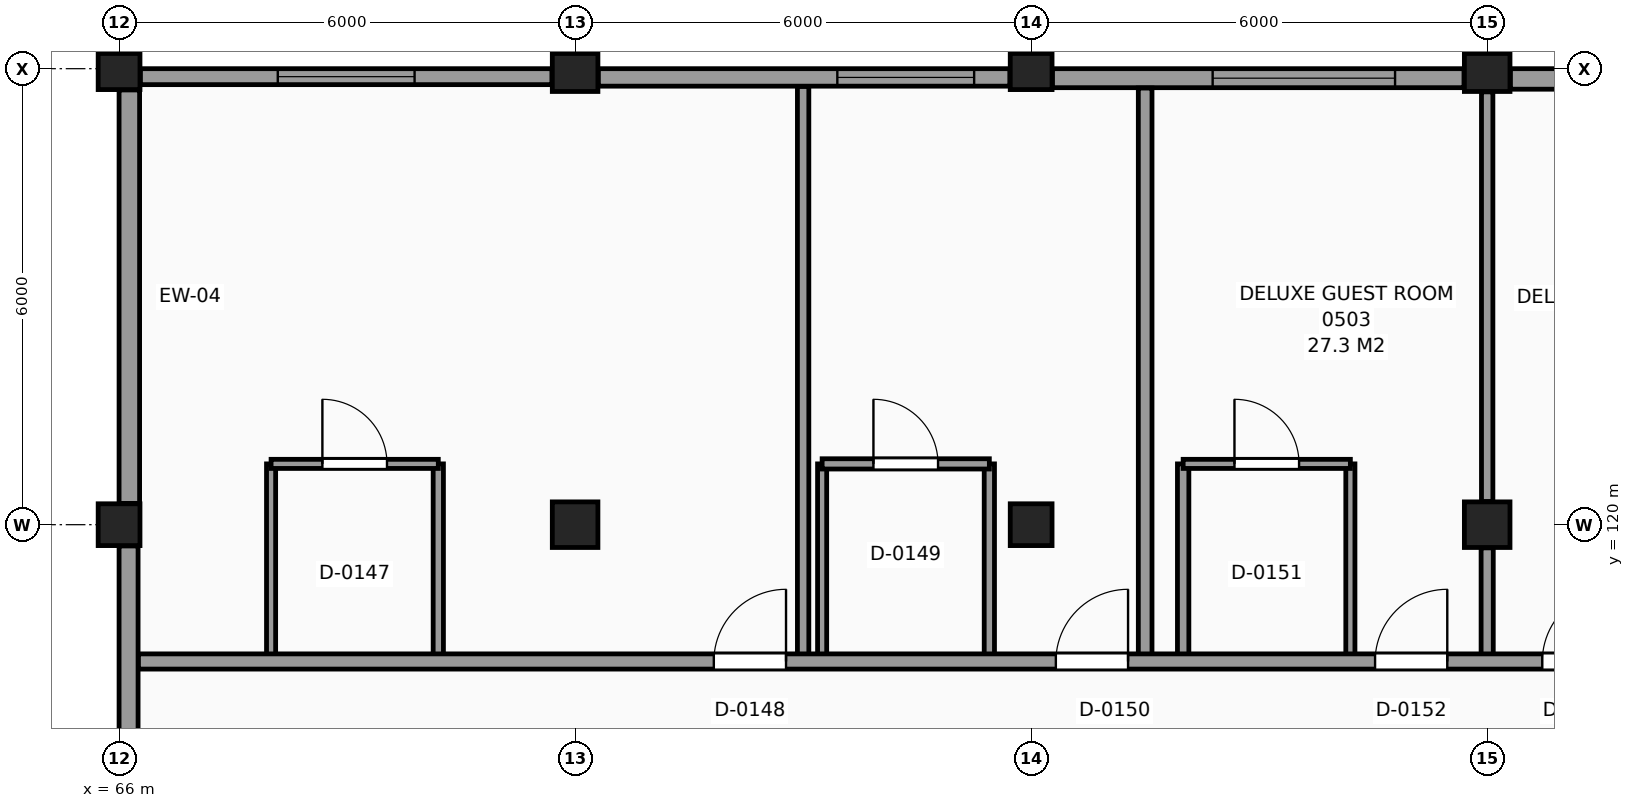
"""IFC4 building model, lengths in metres.
Left out: names, types, materials, properties, quantities, classifications, styles, units other than length and angle.
Written with IfcOpenShell. Run it as: python <this file> out.ifc"""

import sys

from ifc_helpers import new_model, si_unit, direction, frame, frame_2d, origin, origin_2d, place, context, subcontext, project, spatial, rectangle, extrude, element, fill, save


model = new_model("IFC4")
c1 = context("Model", 3, precision=1e-05, world=origin(), true_north=direction((0.0, 1.0)))
c2 = subcontext(c1, "Body", "Model", "MODEL_VIEW")
j1 = project(units=[si_unit("LENGTHUNIT", "METRE"), si_unit("PLANEANGLEUNIT", "RADIAN")], contexts=[c1])
p1 = place(None, origin())
s1 = spatial("IfcSite", under=j1, at=p1, CompositionType="ELEMENT")
p2 = place(p1, origin())
s2 = spatial("IfcBuilding", under=s1, at=p2, CompositionType="ELEMENT")
p3 = place(p2, frame((0.0, 0.0, 24.6)))
s3 = spatial("IfcBuildingStorey", under=s2, at=p3, CompositionType="ELEMENT", Elevation=24.6)
for number, where, z_axis, x_axis in (
    (1, (66.0, 120.0, 0.0), (0.0, 0.0, 1.0), (1.0, 0.0, 0.0)),
    (2, (66.0, 126.0, 0.0), (0.0, 0.0, 1.0), (1.0, 0.0, 0.0)),
):
    element("IfcColumn", number, at=place(p3, frame(where, z_axis=z_axis, x_axis=x_axis)), inside=s3, PredefinedType="COLUMN", context=c2, shape_type="SweptSolid", body=[
        extrude(rectangle(XDim=0.55, YDim=0.55, at=origin_2d()), origin(), (0.0, 0.0, 1.0), 3.6),
    ])
for number, where, z_axis, x_axis in (
    (3, (72.0, 120.0, 0.0), (0.0, 0.0, 1.0), (1.0, 0.0, 0.0)),
    (4, (72.0, 126.0, 0.0), (0.0, 0.0, 1.0), (1.0, 0.0, 0.0)),
):
    element("IfcColumn", number, at=place(p3, frame(where, z_axis=z_axis, x_axis=x_axis)), inside=s3, PredefinedType="COLUMN", context=c2, shape_type="SweptSolid", body=[
        extrude(rectangle(XDim=0.6, YDim=0.6, at=origin_2d()), origin(), (0.0, 0.0, 1.0), 3.6),
    ])
for number, where, z_axis, x_axis in (
    (5, (78.0, 120.0, 0.0), (0.0, 0.0, 1.0), (1.0, 0.0, 0.0)),
    (6, (78.0, 126.0, 0.0), (0.0, 0.0, 1.0), (1.0, 0.0, 0.0)),
):
    element("IfcColumn", number, at=place(p3, frame(where, z_axis=z_axis, x_axis=x_axis)), inside=s3, PredefinedType="COLUMN", context=c2, shape_type="SweptSolid", body=[
        extrude(rectangle(XDim=0.55, YDim=0.55, at=origin_2d()), origin(), (0.0, 0.0, 1.0), 3.6),
    ])
for number, where, z_axis, x_axis in (
    (7, (84.0, 120.0, 0.0), (0.0, 0.0, 1.0), (1.0, 0.0, 0.0)),
    (8, (84.0, 126.0, 0.0), (0.0, 0.0, 1.0), (1.0, 0.0, 0.0)),
):
    element("IfcColumn", number, at=place(p3, frame(where, z_axis=z_axis, x_axis=x_axis)), inside=s3, PredefinedType="COLUMN", context=c2, shape_type="SweptSolid", body=[
        extrude(rectangle(XDim=0.6, YDim=0.6, at=origin_2d()), origin(), (0.0, 0.0, 1.0), 3.6),
    ])
p4 = place(p3, frame((89.72, 125.865, 0.0), z_axis=(0.0, 0.0, 1.0), x_axis=(-1.0, 0.0, 0.0)))
e9 = element("IfcWall", 9, at=p4, inside=s3, PredefinedType="SOLIDWALL", context=c2, shape_type="SweptSolid", body=[
    extrude(rectangle(XDim=5.415, YDim=0.27, at=frame_2d((2.708, 0.0))), origin(), (0.0, 0.0, 1.0), 2.73),
])
p5 = place(p4, frame((2.108, 0.0, 0.8)))
e10 = element("IfcOpeningElement", 10, at=p5, cuts=e9, PredefinedType="OPENING", context=c2, shape_type="SweptSolid", body=[
    extrude(rectangle(XDim=2.4, YDim=1.75, at=frame_2d((1.2, 0.875))), frame((0.0, 0.145, 0.0), z_axis=(0.0, -1.0, 0.0), x_axis=(1.0, 0.0, 0.0)), (0.0, 0.0, 1.0), 0.29),
])
p6 = place(p3, frame((83.695, 125.875, 0.0), z_axis=(0.0, 0.0, 1.0), x_axis=(-1.0, 0.0, 0.0)))
e11 = element("IfcWall", 11, at=p6, inside=s3, PredefinedType="SOLIDWALL", context=c2, shape_type="SweptSolid", body=[
    extrude(rectangle(XDim=5.415, YDim=0.25, at=frame_2d((2.708, 0.0))), origin(), (0.0, 0.0, 1.0), 2.73),
])
p7 = place(p6, frame((0.907, 0.0, 0.8)))
e12 = element("IfcOpeningElement", 12, at=p7, cuts=e11, PredefinedType="OPENING", context=c2, shape_type="SweptSolid", body=[
    extrude(rectangle(XDim=2.4, YDim=1.75, at=frame_2d((1.2, 0.875))), frame((0.0, 0.135, 0.0), z_axis=(0.0, -1.0, 0.0), x_axis=(1.0, 0.0, 0.0)), (0.0, 0.0, 1.0), 0.27),
])
p8 = place(p3, frame((77.72, 125.885, 0.0), z_axis=(0.0, 0.0, 1.0), x_axis=(-1.0, 0.0, 0.0)))
e13 = element("IfcWall", 13, at=p8, inside=s3, PredefinedType="SOLIDWALL", context=c2, shape_type="SweptSolid", body=[
    extrude(rectangle(XDim=5.415, YDim=0.23, at=frame_2d((2.708, 0.0))), origin(), (0.0, 0.0, 1.0), 2.73),
])
p9 = place(p8, frame((0.47, 0.0, 0.8)))
e14 = element("IfcOpeningElement", 14, at=p9, cuts=e13, PredefinedType="OPENING", context=c2, shape_type="SweptSolid", body=[
    extrude(rectangle(XDim=1.8, YDim=1.7, at=frame_2d((0.9, 0.85))), frame((0.0, 0.125, 0.0), z_axis=(0.0, -1.0, 0.0), x_axis=(1.0, 0.0, 0.0)), (0.0, 0.0, 1.0), 0.25),
])
p10 = place(p3, frame((71.695, 125.895, 0.0), z_axis=(0.0, 0.0, 1.0), x_axis=(-1.0, 0.0, 0.0)))
e15 = element("IfcWall", 15, at=p10, inside=s3, PredefinedType="SOLIDWALL", context=c2, shape_type="SweptSolid", body=[
    extrude(rectangle(XDim=5.415, YDim=0.21, at=frame_2d((2.708, 0.0))), origin(), (0.0, 0.0, 1.0), 2.73),
])
p11 = place(p10, frame((1.807, 0.0, 0.8)))
e16 = element("IfcOpeningElement", 16, at=p11, cuts=e15, PredefinedType="OPENING", context=c2, shape_type="SweptSolid", body=[
    extrude(rectangle(XDim=1.8, YDim=1.7, at=frame_2d((0.9, 0.85))), frame((0.0, 0.115, 0.0), z_axis=(0.0, -1.0, 0.0), x_axis=(1.0, 0.0, 0.0)), (0.0, 0.0, 1.0), 0.23),
])
p12 = place(p3, frame((66.135, 125.72, 0.0), z_axis=(0.0, 0.0, 1.0), x_axis=(0.0, -1.0, 0.0)))
e17 = element("IfcWall", 17, at=p12, inside=s3, PredefinedType="SOLIDWALL", context=c2, shape_type="SweptSolid", body=[
    extrude(rectangle(XDim=5.44, YDim=0.27, at=frame_2d((2.72, 0.0))), origin(), (0.0, 0.0, 1.0), 2.58),
])
p13 = place(p3, frame((66.125, 119.72, 0.0), z_axis=(0.0, 0.0, 1.0), x_axis=(0.0, -1.0, 0.0)))
e18 = element("IfcWall", 18, at=p13, inside=s3, PredefinedType="SOLIDWALL", context=c2, shape_type="SweptSolid", body=[
    extrude(rectangle(XDim=5.44, YDim=0.25, at=frame_2d((2.72, 0.0))), origin(), (0.0, 0.0, 1.0), 2.58),
])
p14 = place(p3, frame((68.0, 118.2, 0.0), z_axis=(0.0, 0.0, 1.0), x_axis=(0.0, 1.0, 0.0)))
e19 = element("IfcWall", 19, at=p14, inside=s3, PredefinedType="PARTITIONING", context=c2, shape_type="SweptSolid", body=[
    extrude(rectangle(XDim=2.6, YDim=0.12, at=frame_2d((1.3, 0.0))), origin(), (0.0, 0.0, 1.0), 3.38),
])
p15 = place(p3, frame((70.2, 118.2, 0.0), z_axis=(0.0, 0.0, 1.0), x_axis=(0.0, 1.0, 0.0)))
e20 = element("IfcWall", 20, at=p15, inside=s3, PredefinedType="PARTITIONING", context=c2, shape_type="SweptSolid", body=[
    extrude(rectangle(XDim=2.6, YDim=0.135, at=frame_2d((1.3, 0.0))), origin(), (0.0, 0.0, 1.0), 3.38),
])
p16 = place(p3, frame((75.0, 118.2, 0.0), z_axis=(0.0, 0.0, 1.0), x_axis=(0.0, 1.0, 0.0)))
e21 = element("IfcWall", 21, at=p16, inside=s3, PredefinedType="PARTITIONING", context=c2, shape_type="SweptSolid", body=[
    extrude(rectangle(XDim=7.565, YDim=0.15, at=frame_2d((3.782, 0.0))), origin(), (0.0, 0.0, 1.0), 3.38),
])
p17 = place(p3, frame((75.25, 118.2, 0.0), z_axis=(0.0, 0.0, 1.0), x_axis=(0.0, 1.0, 0.0)))
e22 = element("IfcWall", 22, at=p17, inside=s3, PredefinedType="PARTITIONING", context=c2, shape_type="SweptSolid", body=[
    extrude(rectangle(XDim=2.6, YDim=0.12, at=frame_2d((1.3, 0.0))), origin(), (0.0, 0.0, 1.0), 3.38),
])
p18 = place(p3, frame((77.45, 118.2, 0.0), z_axis=(0.0, 0.0, 1.0), x_axis=(0.0, 1.0, 0.0)))
e23 = element("IfcWall", 23, at=p18, inside=s3, PredefinedType="PARTITIONING", context=c2, shape_type="SweptSolid", body=[
    extrude(rectangle(XDim=2.6, YDim=0.135, at=frame_2d((1.3, 0.0))), origin(), (0.0, 0.0, 1.0), 3.38),
])
p19 = place(p3, frame((79.5, 118.2, 0.0), z_axis=(0.0, 0.0, 1.0), x_axis=(0.0, 1.0, 0.0)))
e24 = element("IfcWall", 24, at=p19, inside=s3, PredefinedType="PARTITIONING", context=c2, shape_type="SweptSolid", body=[
    extrude(rectangle(XDim=7.545, YDim=0.18, at=frame_2d((3.772, 0.0))), origin(), (0.0, 0.0, 1.0), 3.38),
])
p20 = place(p3, frame((80.0, 118.2, 0.0), z_axis=(0.0, 0.0, 1.0), x_axis=(0.0, 1.0, 0.0)))
e25 = element("IfcWall", 25, at=p20, inside=s3, PredefinedType="PARTITIONING", context=c2, shape_type="SweptSolid", body=[
    extrude(rectangle(XDim=2.6, YDim=0.15, at=frame_2d((1.3, 0.0))), origin(), (0.0, 0.0, 1.0), 3.38),
])
p21 = place(p3, frame((82.2, 118.2, 0.0), z_axis=(0.0, 0.0, 1.0), x_axis=(0.0, 1.0, 0.0)))
e26 = element("IfcWall", 26, at=p21, inside=s3, PredefinedType="PARTITIONING", context=c2, shape_type="SweptSolid", body=[
    extrude(rectangle(XDim=2.6, YDim=0.12, at=frame_2d((1.3, 0.0))), origin(), (0.0, 0.0, 1.0), 3.38),
])
p22 = place(p3, frame((84.0, 118.2, 0.0), z_axis=(0.0, 0.0, 1.0), x_axis=(0.0, 1.0, 0.0)))
e27 = element("IfcWall", 27, at=p22, inside=s3, PredefinedType="PARTITIONING", context=c2, shape_type="SweptSolid", body=[
    extrude(rectangle(XDim=1.495, YDim=0.16, at=frame_2d((0.748, 0.0))), origin(), (0.0, 0.0, 1.0), 2.58),
])
p23 = place(p3, frame((84.0, 120.305, 0.0), z_axis=(0.0, 0.0, 1.0), x_axis=(0.0, 1.0, 0.0)))
e28 = element("IfcWall", 28, at=p23, inside=s3, PredefinedType="PARTITIONING", context=c2, shape_type="SweptSolid", body=[
    extrude(rectangle(XDim=5.39, YDim=0.15, at=frame_2d((2.695, 0.0))), origin(), (0.0, 0.0, 1.0), 2.58),
])
p24 = place(p3, frame((66.255, 118.2, 0.0), z_axis=(0.0, 0.0, 1.0), x_axis=(1.0, 0.0, 0.0)))
e29 = element("IfcWall", 29, at=p24, inside=s3, PredefinedType="PARTITIONING", context=c2, shape_type="SweptSolid", body=[
    extrude(rectangle(XDim=110.245, YDim=0.2, at=frame_2d((55.123, 0.0))), origin(), (0.0, 0.0, 1.0), 3.38),
])
p25 = place(p24, frame((7.57, 0.0, 0.0)))
e30 = element("IfcOpeningElement", 30, at=p25, cuts=e29, PredefinedType="OPENING", context=c2, shape_type="SweptSolid", body=[
    extrude(rectangle(XDim=0.95, YDim=2.1, at=frame_2d((0.475, 1.05))), frame((0.0, 0.11, 0.0), z_axis=(0.0, -1.0, 0.0), x_axis=(1.0, 0.0, 0.0)), (0.0, 0.0, 1.0), 0.22),
])
p26 = place(p24, frame((12.07, 0.0, 0.0)))
e31 = element("IfcOpeningElement", 31, at=p26, cuts=e29, PredefinedType="OPENING", context=c2, shape_type="SweptSolid", body=[
    extrude(rectangle(XDim=0.95, YDim=2.1, at=frame_2d((0.475, 1.05))), frame((0.0, 0.11, 0.0), z_axis=(0.0, -1.0, 0.0), x_axis=(1.0, 0.0, 0.0)), (0.0, 0.0, 1.0), 0.22),
])
p27 = place(p24, frame((16.27, 0.0, 0.0)))
e32 = element("IfcOpeningElement", 32, at=p27, cuts=e29, PredefinedType="OPENING", context=c2, shape_type="SweptSolid", body=[
    extrude(rectangle(XDim=0.95, YDim=2.1, at=frame_2d((0.475, 1.05))), frame((0.0, 0.11, 0.0), z_axis=(0.0, -1.0, 0.0), x_axis=(1.0, 0.0, 0.0)), (0.0, 0.0, 1.0), 0.22),
])
p28 = place(p24, frame((18.47, 0.0, 0.0)))
e33 = element("IfcOpeningElement", 33, at=p28, cuts=e29, PredefinedType="OPENING", context=c2, shape_type="SweptSolid", body=[
    extrude(rectangle(XDim=0.95, YDim=2.1, at=frame_2d((0.475, 1.05))), frame((0.0, 0.11, 0.0), z_axis=(0.0, -1.0, 0.0), x_axis=(1.0, 0.0, 0.0)), (0.0, 0.0, 1.0), 0.22),
])
p29 = place(p24, frame((32.32, 0.0, 0.0)))
e34 = element("IfcOpeningElement", 34, at=p29, cuts=e29, PredefinedType="OPENING", context=c2, shape_type="SweptSolid", body=[
    extrude(rectangle(XDim=0.95, YDim=2.1, at=frame_2d((0.475, 1.05))), frame((0.0, 0.11, 0.0), z_axis=(0.0, -1.0, 0.0), x_axis=(1.0, 0.0, 0.0)), (0.0, 0.0, 1.0), 0.22),
])
p30 = place(p24, frame((36.47, 0.0, 0.0)))
e35 = element("IfcOpeningElement", 35, at=p30, cuts=e29, PredefinedType="OPENING", context=c2, shape_type="SweptSolid", body=[
    extrude(rectangle(XDim=0.95, YDim=2.1, at=frame_2d((0.475, 1.05))), frame((0.0, 0.11, 0.0), z_axis=(0.0, -1.0, 0.0), x_axis=(1.0, 0.0, 0.0)), (0.0, 0.0, 1.0), 0.22),
])
p31 = place(p24, frame((46.27, 0.0, 0.0)))
e36 = element("IfcOpeningElement", 36, at=p31, cuts=e29, PredefinedType="OPENING", context=c2, shape_type="SweptSolid", body=[
    extrude(rectangle(XDim=0.95, YDim=2.1, at=frame_2d((0.475, 1.05))), frame((0.0, 0.11, 0.0), z_axis=(0.0, -1.0, 0.0), x_axis=(1.0, 0.0, 0.0)), (0.0, 0.0, 1.0), 0.22),
])
p32 = place(p24, frame((48.47, 0.0, 0.0)))
e37 = element("IfcOpeningElement", 37, at=p32, cuts=e29, PredefinedType="OPENING", context=c2, shape_type="SweptSolid", body=[
    extrude(rectangle(XDim=0.95, YDim=2.1, at=frame_2d((0.475, 1.05))), frame((0.0, 0.11, 0.0), z_axis=(0.0, -1.0, 0.0), x_axis=(1.0, 0.0, 0.0)), (0.0, 0.0, 1.0), 0.22),
])
p33 = place(p24, frame((52.87, 0.0, 0.0)))
e38 = element("IfcOpeningElement", 38, at=p33, cuts=e29, PredefinedType="OPENING", context=c2, shape_type="SweptSolid", body=[
    extrude(rectangle(XDim=0.95, YDim=2.1, at=frame_2d((0.475, 1.05))), frame((0.0, 0.11, 0.0), z_axis=(0.0, -1.0, 0.0), x_axis=(1.0, 0.0, 0.0)), (0.0, 0.0, 1.0), 0.22),
])
p34 = place(p24, frame((60.07, 0.0, 0.0)))
e39 = element("IfcOpeningElement", 39, at=p34, cuts=e29, PredefinedType="OPENING", context=c2, shape_type="SweptSolid", body=[
    extrude(rectangle(XDim=0.95, YDim=2.1, at=frame_2d((0.475, 1.05))), frame((0.0, 0.11, 0.0), z_axis=(0.0, -1.0, 0.0), x_axis=(1.0, 0.0, 0.0)), (0.0, 0.0, 1.0), 0.22),
])
p35 = place(p24, frame((68.32, 0.0, 0.0)))
e40 = element("IfcOpeningElement", 40, at=p35, cuts=e29, PredefinedType="OPENING", context=c2, shape_type="SweptSolid", body=[
    extrude(rectangle(XDim=0.95, YDim=2.1, at=frame_2d((0.475, 1.05))), frame((0.0, 0.11, 0.0), z_axis=(0.0, -1.0, 0.0), x_axis=(1.0, 0.0, 0.0)), (0.0, 0.0, 1.0), 0.22),
])
p36 = place(p24, frame((80.32, 0.0, 0.0)))
e41 = element("IfcOpeningElement", 41, at=p36, cuts=e29, PredefinedType="OPENING", context=c2, shape_type="SweptSolid", body=[
    extrude(rectangle(XDim=0.95, YDim=2.1, at=frame_2d((0.475, 1.05))), frame((0.0, 0.11, 0.0), z_axis=(0.0, -1.0, 0.0), x_axis=(1.0, 0.0, 0.0)), (0.0, 0.0, 1.0), 0.22),
])
p37 = place(p24, frame((82.87, 0.0, 0.0)))
e42 = element("IfcOpeningElement", 42, at=p37, cuts=e29, PredefinedType="OPENING", context=c2, shape_type="SweptSolid", body=[
    extrude(rectangle(XDim=0.95, YDim=2.1, at=frame_2d((0.475, 1.05))), frame((0.0, 0.11, 0.0), z_axis=(0.0, -1.0, 0.0), x_axis=(1.0, 0.0, 0.0)), (0.0, 0.0, 1.0), 0.22),
])
p38 = place(p24, frame((90.07, 0.0, 0.0)))
e43 = element("IfcOpeningElement", 43, at=p38, cuts=e29, PredefinedType="OPENING", context=c2, shape_type="SweptSolid", body=[
    extrude(rectangle(XDim=0.95, YDim=2.1, at=frame_2d((0.475, 1.05))), frame((0.0, 0.11, 0.0), z_axis=(0.0, -1.0, 0.0), x_axis=(1.0, 0.0, 0.0)), (0.0, 0.0, 1.0), 0.22),
])
p39 = place(p24, frame((94.27, 0.0, 0.0)))
e44 = element("IfcOpeningElement", 44, at=p39, cuts=e29, PredefinedType="OPENING", context=c2, shape_type="SweptSolid", body=[
    extrude(rectangle(XDim=0.95, YDim=2.1, at=frame_2d((0.475, 1.05))), frame((0.0, 0.11, 0.0), z_axis=(0.0, -1.0, 0.0), x_axis=(1.0, 0.0, 0.0)), (0.0, 0.0, 1.0), 0.22),
])
p40 = place(p24, frame((103.57, 0.0, 0.0)))
e45 = element("IfcOpeningElement", 45, at=p40, cuts=e29, PredefinedType="OPENING", context=c2, shape_type="SweptSolid", body=[
    extrude(rectangle(XDim=0.95, YDim=2.1, at=frame_2d((0.475, 1.05))), frame((0.0, 0.11, 0.0), z_axis=(0.0, -1.0, 0.0), x_axis=(1.0, 0.0, 0.0)), (0.0, 0.0, 1.0), 0.22),
])
p41 = place(p24, frame((104.97, 0.0, 0.0)))
e46 = element("IfcOpeningElement", 46, at=p41, cuts=e29, PredefinedType="OPENING", context=c2, shape_type="SweptSolid", body=[
    extrude(rectangle(XDim=0.95, YDim=2.1, at=frame_2d((0.475, 1.05))), frame((0.0, 0.11, 0.0), z_axis=(0.0, -1.0, 0.0), x_axis=(1.0, 0.0, 0.0)), (0.0, 0.0, 1.0), 0.22),
])
p42 = place(p3, frame((68.0, 120.8, 0.0), z_axis=(0.0, 0.0, 1.0), x_axis=(1.0, 0.0, 0.0)))
e47 = element("IfcWall", 47, at=p42, inside=s3, PredefinedType="PARTITIONING", context=c2, shape_type="SweptSolid", body=[
    extrude(rectangle(XDim=2.2, YDim=0.12, at=frame_2d((1.1, 0.0))), origin(), (0.0, 0.0, 1.0), 3.38),
])
p43 = place(p42, frame((0.675, 0.0, 0.0)))
e48 = element("IfcOpeningElement", 48, at=p43, cuts=e47, PredefinedType="OPENING", context=c2, shape_type="SweptSolid", body=[
    extrude(rectangle(XDim=0.85, YDim=2.1, at=frame_2d((0.425, 1.05))), frame((0.0, 0.07, 0.0), z_axis=(0.0, -1.0, 0.0), x_axis=(1.0, 0.0, 0.0)), (0.0, 0.0, 1.0), 0.14),
])
p44 = place(p3, frame((75.25, 120.8, 0.0), z_axis=(0.0, 0.0, 1.0), x_axis=(1.0, 0.0, 0.0)))
e49 = element("IfcWall", 49, at=p44, inside=s3, PredefinedType="PARTITIONING", context=c2, shape_type="SweptSolid", body=[
    extrude(rectangle(XDim=2.2, YDim=0.135, at=frame_2d((1.1, 0.0))), origin(), (0.0, 0.0, 1.0), 3.38),
])
p45 = place(p44, frame((0.675, 0.0, 0.0)))
e50 = element("IfcOpeningElement", 50, at=p45, cuts=e49, PredefinedType="OPENING", context=c2, shape_type="SweptSolid", body=[
    extrude(rectangle(XDim=0.85, YDim=2.1, at=frame_2d((0.425, 1.05))), frame((0.0, 0.078, 0.0), z_axis=(0.0, -1.0, 0.0), x_axis=(1.0, 0.0, 0.0)), (0.0, 0.0, 1.0), 0.155),
])
p46 = place(p3, frame((80.0, 120.8, 0.0), z_axis=(0.0, 0.0, 1.0), x_axis=(1.0, 0.0, 0.0)))
e51 = element("IfcWall", 51, at=p46, inside=s3, PredefinedType="PARTITIONING", context=c2, shape_type="SweptSolid", body=[
    extrude(rectangle(XDim=2.2, YDim=0.12, at=frame_2d((1.1, 0.0))), origin(), (0.0, 0.0, 1.0), 3.38),
])
p47 = place(p46, frame((0.675, 0.0, 0.0)))
e52 = element("IfcOpeningElement", 52, at=p47, cuts=e51, PredefinedType="OPENING", context=c2, shape_type="SweptSolid", body=[
    extrude(rectangle(XDim=0.85, YDim=2.1, at=frame_2d((0.425, 1.05))), frame((0.0, 0.07, 0.0), z_axis=(0.0, -1.0, 0.0), x_axis=(1.0, 0.0, 0.0)), (0.0, 0.0, 1.0), 0.14),
])
p48 = place(p11, origin())
e53 = element("IfcWindow", 53, at=p48, inside=s3, PartitioningType="SINGLE_PANEL", PredefinedType="WINDOW", context=c2, shape_type="SweptSolid", body=[
    extrude(rectangle(XDim=1.8, YDim=1.7, at=frame_2d((0.9, 0.85))), frame((0.0, 0.03, 0.0), z_axis=(0.0, -1.0, 0.0), x_axis=(1.0, 0.0, 0.0)), (0.0, 0.0, 1.0), 0.06),
])
fill(e16, e53)
p49 = place(p9, origin())
e54 = element("IfcWindow", 54, at=p49, inside=s3, PartitioningType="SINGLE_PANEL", PredefinedType="WINDOW", context=c2, shape_type="SweptSolid", body=[
    extrude(rectangle(XDim=1.8, YDim=1.7, at=frame_2d((0.9, 0.85))), frame((0.0, 0.03, 0.0), z_axis=(0.0, -1.0, 0.0), x_axis=(1.0, 0.0, 0.0)), (0.0, 0.0, 1.0), 0.06),
])
fill(e14, e54)
p50 = place(p7, origin())
e55 = element("IfcWindow", 55, at=p50, inside=s3, PartitioningType="SINGLE_PANEL", PredefinedType="WINDOW", context=c2, shape_type="SweptSolid", body=[
    extrude(rectangle(XDim=2.4, YDim=1.75, at=frame_2d((1.2, 0.875))), frame((0.0, 0.03, 0.0), z_axis=(0.0, -1.0, 0.0), x_axis=(1.0, 0.0, 0.0)), (0.0, 0.0, 1.0), 0.06),
])
fill(e12, e55)
p51 = place(p43, origin())
e56 = element("IfcDoor", 56, at=p51, inside=s3, OperationType="SINGLE_SWING_LEFT", PredefinedType="DOOR", context=c2, shape_type="SweptSolid", body=[
    extrude(rectangle(XDim=0.85, YDim=2.1, at=frame_2d((0.425, 1.05))), frame((0.0, 0.025, 0.0), z_axis=(0.0, -1.0, 0.0), x_axis=(1.0, 0.0, 0.0)), (0.0, 0.0, 1.0), 0.05),
])
fill(e48, e56)
p52 = place(p25, origin())
e57 = element("IfcDoor", 57, at=p52, inside=s3, OperationType="SINGLE_SWING_RIGHT", PredefinedType="DOOR", context=c2, shape_type="SweptSolid", body=[
    extrude(rectangle(XDim=0.95, YDim=2.1, at=frame_2d((0.475, 1.05))), frame((0.0, 0.025, 0.0), z_axis=(0.0, -1.0, 0.0), x_axis=(1.0, 0.0, 0.0)), (0.0, 0.0, 1.0), 0.05),
])
fill(e30, e57)
p53 = place(p45, origin())
e58 = element("IfcDoor", 58, at=p53, inside=s3, OperationType="SINGLE_SWING_LEFT", PredefinedType="DOOR", context=c2, shape_type="SweptSolid", body=[
    extrude(rectangle(XDim=0.85, YDim=2.1, at=frame_2d((0.425, 1.05))), frame((0.0, 0.025, 0.0), z_axis=(0.0, -1.0, 0.0), x_axis=(1.0, 0.0, 0.0)), (0.0, 0.0, 1.0), 0.05),
])
fill(e50, e58)
p54 = place(p26, origin())
e59 = element("IfcDoor", 59, at=p54, inside=s3, OperationType="SINGLE_SWING_RIGHT", PredefinedType="DOOR", context=c2, shape_type="SweptSolid", body=[
    extrude(rectangle(XDim=0.95, YDim=2.1, at=frame_2d((0.475, 1.05))), frame((0.0, 0.025, 0.0), z_axis=(0.0, -1.0, 0.0), x_axis=(1.0, 0.0, 0.0)), (0.0, 0.0, 1.0), 0.05),
])
fill(e31, e59)
p55 = place(p47, origin())
e60 = element("IfcDoor", 60, at=p55, inside=s3, OperationType="SINGLE_SWING_LEFT", PredefinedType="DOOR", context=c2, shape_type="SweptSolid", body=[
    extrude(rectangle(XDim=0.85, YDim=2.1, at=frame_2d((0.425, 1.05))), frame((0.0, 0.025, 0.0), z_axis=(0.0, -1.0, 0.0), x_axis=(1.0, 0.0, 0.0)), (0.0, 0.0, 1.0), 0.05),
])
fill(e52, e60)
p56 = place(p27, origin())
e61 = element("IfcDoor", 61, at=p56, inside=s3, OperationType="SINGLE_SWING_RIGHT", PredefinedType="DOOR", context=c2, shape_type="SweptSolid", body=[
    extrude(rectangle(XDim=0.95, YDim=2.1, at=frame_2d((0.475, 1.05))), frame((0.0, 0.025, 0.0), z_axis=(0.0, -1.0, 0.0), x_axis=(1.0, 0.0, 0.0)), (0.0, 0.0, 1.0), 0.05),
])
fill(e32, e61)
p57 = place(p28, origin())
e62 = element("IfcDoor", 62, at=p57, inside=s3, OperationType="SINGLE_SWING_RIGHT", PredefinedType="DOOR", context=c2, shape_type="SweptSolid", body=[
    extrude(rectangle(XDim=0.95, YDim=2.1, at=frame_2d((0.475, 1.05))), frame((0.0, 0.025, 0.0), z_axis=(0.0, -1.0, 0.0), x_axis=(1.0, 0.0, 0.0)), (0.0, 0.0, 1.0), 0.05),
])
fill(e33, e62)
save(model, sys.argv[1])
